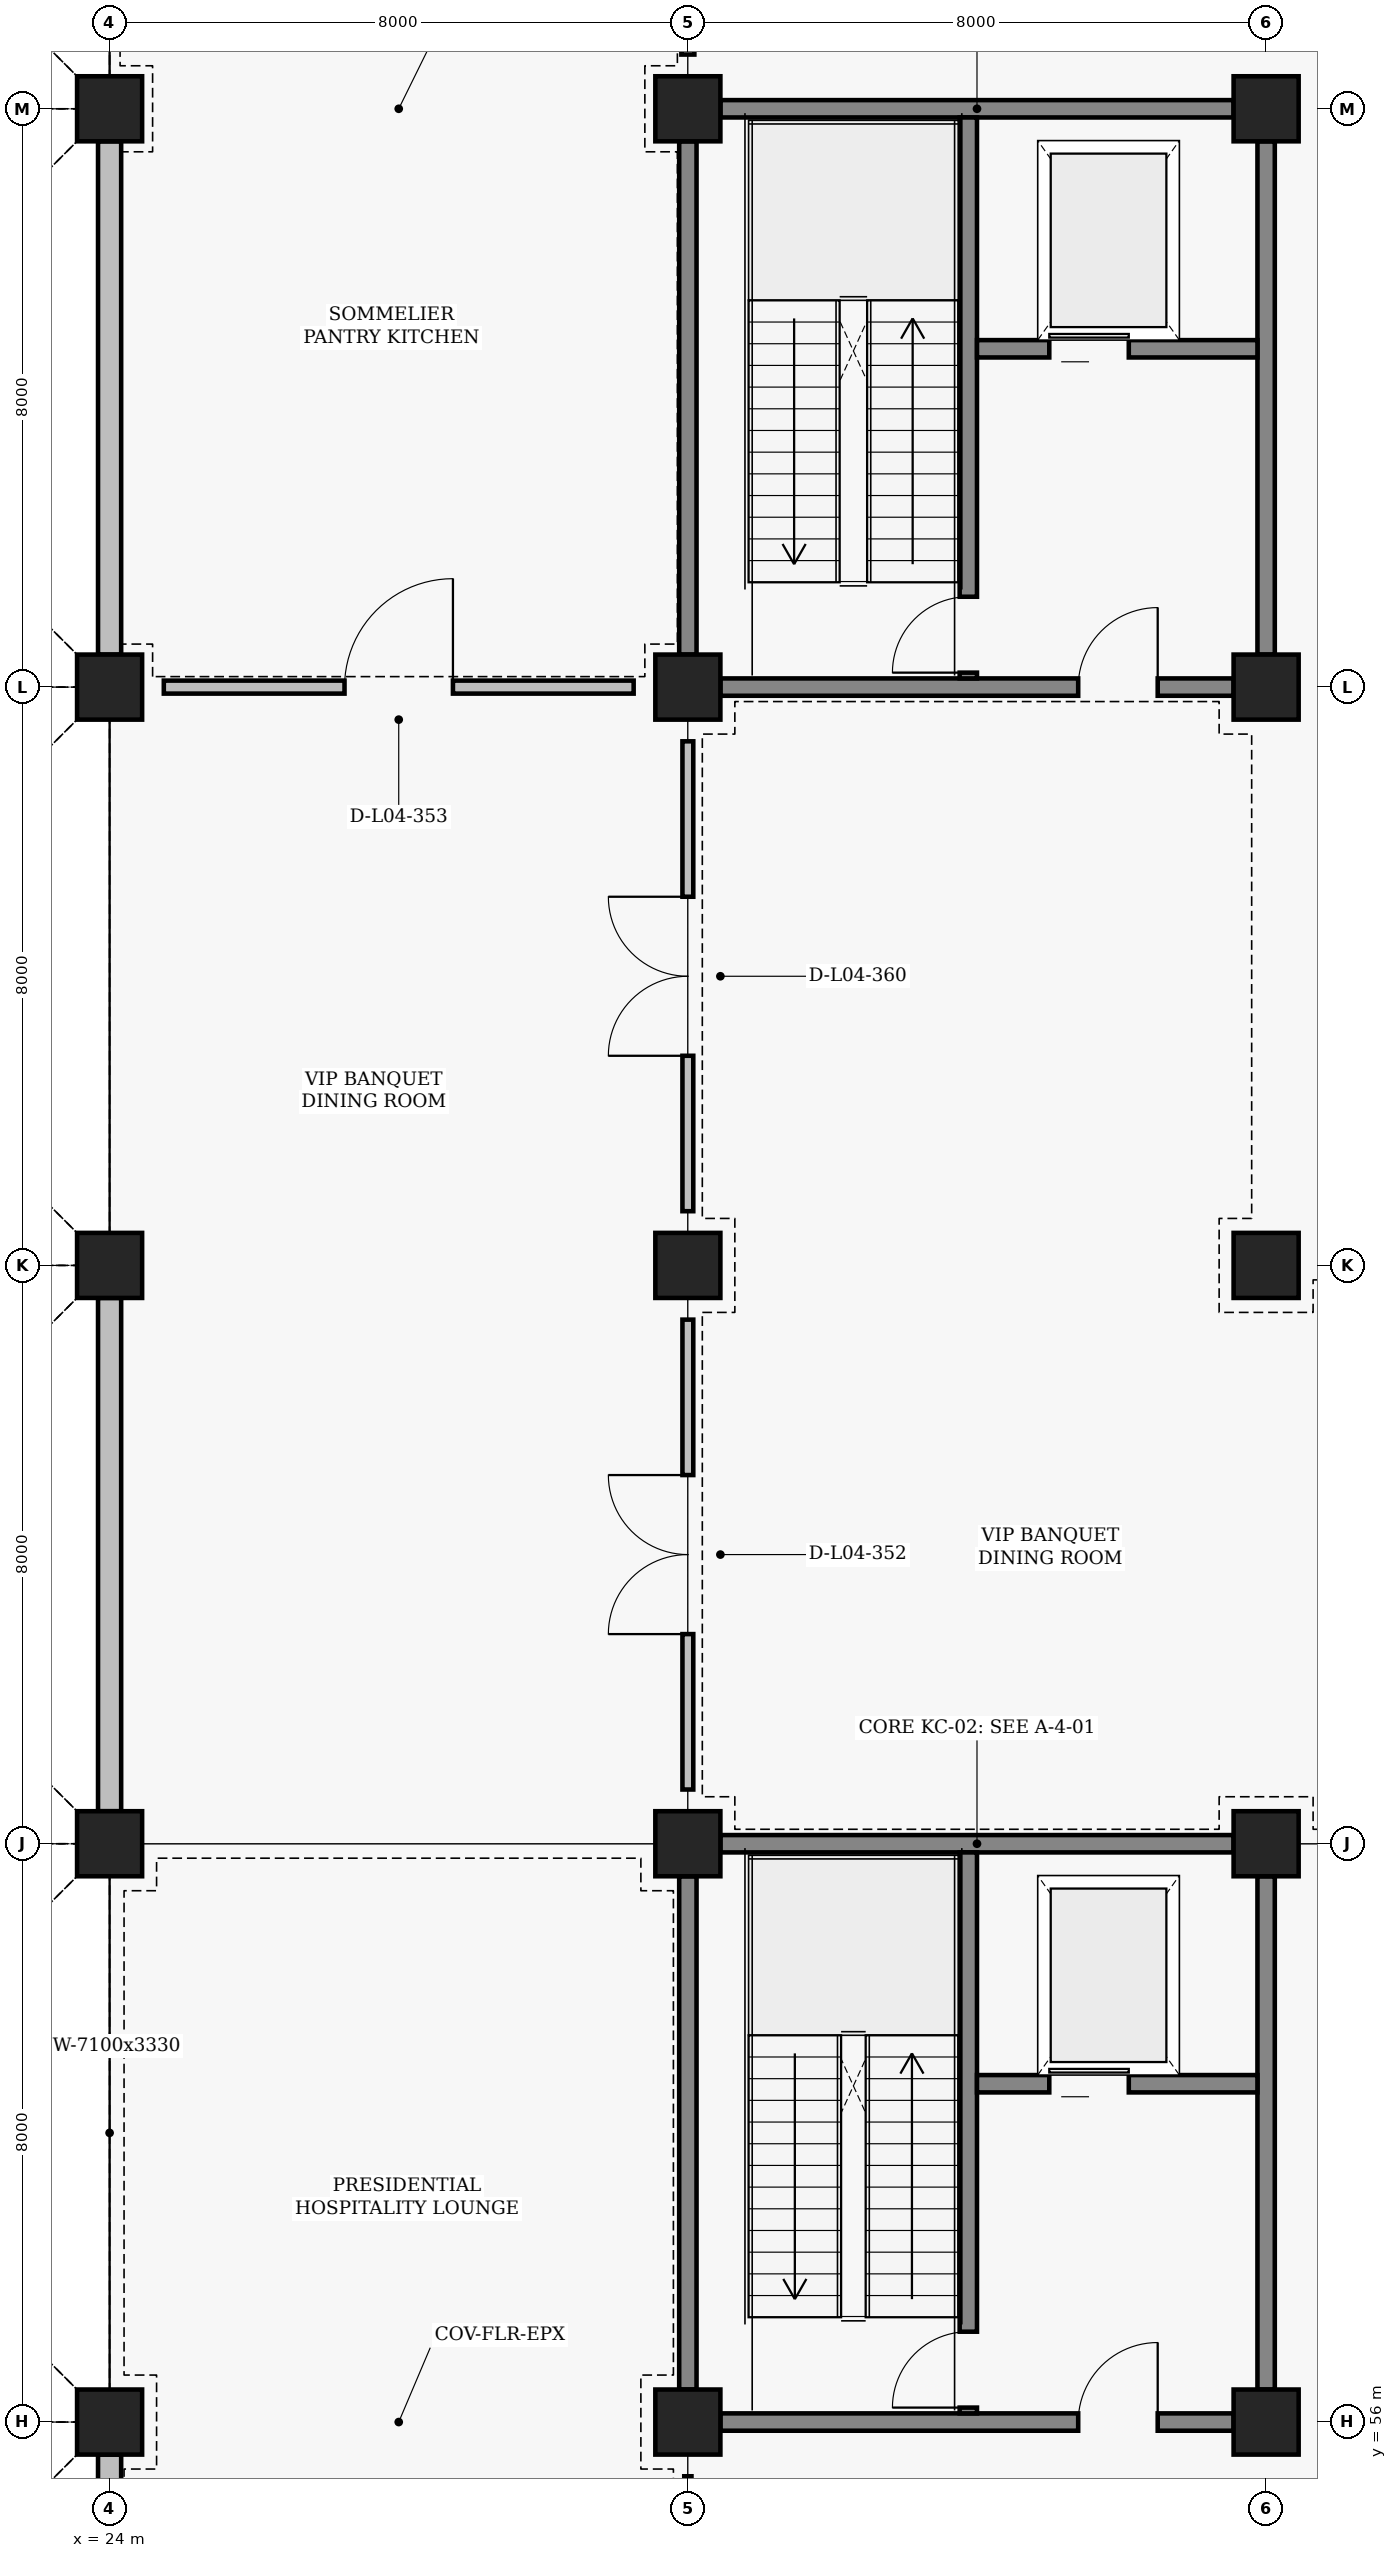
"""IFC4 building model, lengths in metres.
Left out: names, types, materials, properties, quantities, classifications, styles, units other than length and angle.
Written with IfcOpenShell. Run it as: python <this file> out.ifc"""

import sys

from ifc_helpers import new_model, si_unit, direction, frame, frame_2d, origin, origin_2d, place, context, subcontext, project, spatial, rectangle, extrude, element, fill, save


model = new_model("IFC4")
c1 = context("Model", 3, precision=1e-05, world=origin(), true_north=direction((0.0, 1.0)))
c2 = subcontext(c1, "Body", "Model", "MODEL_VIEW")
j1 = project(units=[si_unit("LENGTHUNIT", "METRE"), si_unit("PLANEANGLEUNIT", "RADIAN")], contexts=[c1])
p1 = place(None, origin())
s1 = spatial("IfcSite", under=j1, at=p1, CompositionType="ELEMENT")
p2 = place(p1, origin())
s2 = spatial("IfcBuilding", under=s1, at=p2, CompositionType="ELEMENT")
p3 = place(p2, frame((0.0, 0.0, 14.4)))
s3 = spatial("IfcBuildingStorey", under=s2, at=p3, CompositionType="ELEMENT", Elevation=14.4)
for number, where, z_axis, x_axis in (
    (1, (24.0, 56.0, 0.0), (0.0, 0.0, 1.0), (1.0, 0.0, 0.0)),
    (2, (24.0, 64.0, 0.0), (0.0, 0.0, 1.0), (1.0, 0.0, 0.0)),
    (3, (24.0, 72.0, 0.0), (0.0, 0.0, 1.0), (1.0, 0.0, 0.0)),
    (4, (24.0, 80.0, 0.0), (0.0, 0.0, 1.0), (1.0, 0.0, 0.0)),
    (5, (24.0, 88.0, 0.0), (0.0, 0.0, 1.0), (1.0, 0.0, 0.0)),
    (6, (32.0, 56.0, 0.0), (0.0, 0.0, 1.0), (1.0, 0.0, 0.0)),
    (7, (32.0, 64.0, 0.0), (0.0, 0.0, 1.0), (1.0, 0.0, 0.0)),
    (8, (32.0, 72.0, 0.0), (0.0, 0.0, 1.0), (1.0, 0.0, 0.0)),
    (9, (32.0, 80.0, 0.0), (0.0, 0.0, 1.0), (1.0, 0.0, 0.0)),
    (10, (32.0, 88.0, 0.0), (0.0, 0.0, 1.0), (1.0, 0.0, 0.0)),
    (11, (40.0, 56.0, 0.0), (0.0, 0.0, 1.0), (1.0, 0.0, 0.0)),
    (12, (40.0, 64.0, 0.0), (0.0, 0.0, 1.0), (1.0, 0.0, 0.0)),
    (13, (40.0, 72.0, 0.0), (0.0, 0.0, 1.0), (1.0, 0.0, 0.0)),
    (14, (40.0, 80.0, 0.0), (0.0, 0.0, 1.0), (1.0, 0.0, 0.0)),
    (15, (40.0, 88.0, 0.0), (0.0, 0.0, 1.0), (1.0, 0.0, 0.0)),
):
    element("IfcColumn", number, at=place(p3, frame(where, z_axis=z_axis, x_axis=x_axis)), inside=s3, PredefinedType="COLUMN", context=c2, shape_type="SweptSolid", body=[
        extrude(rectangle(XDim=0.9, YDim=0.9, at=origin_2d()), origin(), (0.0, 0.0, 1.0), 4.2),
    ])
for number, where, z_axis, x_axis in (
    (16, (24.0, 48.45, 0.0), (0.0, 0.0, 1.0), (0.0, 1.0, 0.0)),
    (17, (24.0, 64.45, 0.0), (0.0, 0.0, 1.0), (0.0, 1.0, 0.0)),
    (18, (24.0, 80.45, 0.0), (0.0, 0.0, 1.0), (0.0, 1.0, 0.0)),
):
    element("IfcWall", number, at=place(p3, frame(where, z_axis=z_axis, x_axis=x_axis)), inside=s3, PredefinedType="SOLIDWALL", context=c2, shape_type="SweptSolid", body=[
        extrude(rectangle(XDim=7.1, YDim=0.32, at=frame_2d((3.55, 0.0))), origin(), (0.0, 0.0, 1.0), 3.33),
    ])
p4 = place(p3, frame((32.45, 56.0, 0.0), z_axis=(0.0, 0.0, 1.0), x_axis=(1.0, 0.0, 0.0)))
e19 = element("IfcWall", 19, at=p4, inside=s3, PredefinedType="SHEAR", context=c2, shape_type="SweptSolid", body=[
    extrude(rectangle(XDim=7.1, YDim=0.24, at=frame_2d((3.55, 0.0))), origin(), (0.0, 0.0, 1.0), 3.33),
])
p5 = place(p4, frame((4.95, 0.0, 0.0)))
e20 = element("IfcOpeningElement", 20, at=p5, cuts=e19, PredefinedType="OPENING", context=c2, shape_type="SweptSolid", body=[
    extrude(rectangle(XDim=1.1, YDim=2.2, at=frame_2d((0.55, 1.1))), frame((0.0, 0.13, 0.0), z_axis=(0.0, -1.0, 0.0), x_axis=(1.0, 0.0, 0.0)), (0.0, 0.0, 1.0), 0.26),
])
for number, where, z_axis, x_axis in (
    (21, (32.45, 64.0, 0.0), (0.0, 0.0, 1.0), (1.0, 0.0, 0.0)),
    (22, (32.0, 56.45, 0.0), (0.0, 0.0, 1.0), (0.0, 1.0, 0.0)),
    (23, (40.0, 56.45, 0.0), (0.0, 0.0, 1.0), (0.0, 1.0, 0.0)),
):
    element("IfcWall", number, at=place(p3, frame(where, z_axis=z_axis, x_axis=x_axis)), inside=s3, PredefinedType="SHEAR", context=c2, shape_type="SweptSolid", body=[
        extrude(rectangle(XDim=7.1, YDim=0.24, at=frame_2d((3.55, 0.0))), origin(), (0.0, 0.0, 1.0), 3.33),
    ])
p6 = place(p3, frame((35.88, 56.12, 0.0), z_axis=(0.0, 0.0, 1.0), x_axis=(0.0, 1.0, 0.0)))
e24 = element("IfcWall", 24, at=p6, inside=s3, PredefinedType="SHEAR", context=c2, shape_type="SweptSolid", body=[
    extrude(rectangle(XDim=7.76, YDim=0.24, at=frame_2d((3.88, 0.0))), origin(), (0.0, 0.0, 1.0), 3.43),
])
p7 = place(p6, frame((0.08, 0.0, 0.0)))
e25 = element("IfcOpeningElement", 25, at=p7, cuts=e24, PredefinedType="OPENING", context=c2, shape_type="SweptSolid", body=[
    extrude(rectangle(XDim=1.05, YDim=2.15, at=frame_2d((0.525, 1.075))), frame((0.0, 0.13, 0.0), z_axis=(0.0, -1.0, 0.0), x_axis=(1.0, 0.0, 0.0)), (0.0, 0.0, 1.0), 0.26),
])
p8 = place(p3, frame((36.0, 60.68, 0.0), z_axis=(0.0, 0.0, 1.0), x_axis=(1.0, 0.0, 0.0)))
e26 = element("IfcWall", 26, at=p8, inside=s3, PredefinedType="SHEAR", context=c2, shape_type="SweptSolid", body=[
    extrude(rectangle(XDim=3.88, YDim=0.24, at=frame_2d((1.94, 0.0))), origin(), (0.0, 0.0, 1.0), 3.33),
])
p9 = place(p8, frame((1.0, 0.0, 0.0)))
e27 = element("IfcOpeningElement", 27, at=p9, cuts=e26, PredefinedType="OPENING", context=c2, shape_type="SweptSolid", body=[
    extrude(rectangle(XDim=1.1, YDim=2.15, at=frame_2d((0.55, 1.075))), frame((0.0, 0.13, 0.0), z_axis=(0.0, -1.0, 0.0), x_axis=(1.0, 0.0, 0.0)), (0.0, 0.0, 1.0), 0.26),
])
p10 = place(p3, frame((32.45, 80.0, 0.0), z_axis=(0.0, 0.0, 1.0), x_axis=(1.0, 0.0, 0.0)))
e28 = element("IfcWall", 28, at=p10, inside=s3, PredefinedType="SHEAR", context=c2, shape_type="SweptSolid", body=[
    extrude(rectangle(XDim=7.1, YDim=0.24, at=frame_2d((3.55, 0.0))), origin(), (0.0, 0.0, 1.0), 3.33),
])
p11 = place(p10, frame((4.95, 0.0, 0.0)))
e29 = element("IfcOpeningElement", 29, at=p11, cuts=e28, PredefinedType="OPENING", context=c2, shape_type="SweptSolid", body=[
    extrude(rectangle(XDim=1.1, YDim=2.2, at=frame_2d((0.55, 1.1))), frame((0.0, 0.13, 0.0), z_axis=(0.0, -1.0, 0.0), x_axis=(1.0, 0.0, 0.0)), (0.0, 0.0, 1.0), 0.26),
])
for number, where, z_axis, x_axis in (
    (30, (32.45, 88.0, 0.0), (0.0, 0.0, 1.0), (1.0, 0.0, 0.0)),
    (31, (32.0, 80.45, 0.0), (0.0, 0.0, 1.0), (0.0, 1.0, 0.0)),
    (32, (40.0, 80.45, 0.0), (0.0, 0.0, 1.0), (0.0, 1.0, 0.0)),
):
    element("IfcWall", number, at=place(p3, frame(where, z_axis=z_axis, x_axis=x_axis)), inside=s3, PredefinedType="SHEAR", context=c2, shape_type="SweptSolid", body=[
        extrude(rectangle(XDim=7.1, YDim=0.24, at=frame_2d((3.55, 0.0))), origin(), (0.0, 0.0, 1.0), 3.33),
    ])
p12 = place(p3, frame((35.88, 80.12, 0.0), z_axis=(0.0, 0.0, 1.0), x_axis=(0.0, 1.0, 0.0)))
e33 = element("IfcWall", 33, at=p12, inside=s3, PredefinedType="SHEAR", context=c2, shape_type="SweptSolid", body=[
    extrude(rectangle(XDim=7.76, YDim=0.24, at=frame_2d((3.88, 0.0))), origin(), (0.0, 0.0, 1.0), 3.43),
])
p13 = place(p12, frame((0.08, 0.0, 0.0)))
e34 = element("IfcOpeningElement", 34, at=p13, cuts=e33, PredefinedType="OPENING", context=c2, shape_type="SweptSolid", body=[
    extrude(rectangle(XDim=1.05, YDim=2.15, at=frame_2d((0.525, 1.075))), frame((0.0, 0.13, 0.0), z_axis=(0.0, -1.0, 0.0), x_axis=(1.0, 0.0, 0.0)), (0.0, 0.0, 1.0), 0.26),
])
p14 = place(p3, frame((36.0, 84.68, 0.0), z_axis=(0.0, 0.0, 1.0), x_axis=(1.0, 0.0, 0.0)))
e35 = element("IfcWall", 35, at=p14, inside=s3, PredefinedType="SHEAR", context=c2, shape_type="SweptSolid", body=[
    extrude(rectangle(XDim=3.88, YDim=0.24, at=frame_2d((1.94, 0.0))), origin(), (0.0, 0.0, 1.0), 3.33),
])
p15 = place(p14, frame((1.0, 0.0, 0.0)))
e36 = element("IfcOpeningElement", 36, at=p15, cuts=e35, PredefinedType="OPENING", context=c2, shape_type="SweptSolid", body=[
    extrude(rectangle(XDim=1.1, YDim=2.15, at=frame_2d((0.55, 1.075))), frame((0.0, 0.13, 0.0), z_axis=(0.0, -1.0, 0.0), x_axis=(1.0, 0.0, 0.0)), (0.0, 0.0, 1.0), 0.26),
])
p16 = place(p3, frame((32.0, 48.75, 0.0), z_axis=(0.0, 0.0, 1.0), x_axis=(0.0, 1.0, 0.0)))
e37 = element("IfcWall", 37, at=p16, inside=s3, PredefinedType="PARTITIONING", context=c2, shape_type="SweptSolid", body=[
    extrude(rectangle(XDim=6.5, YDim=0.1, at=frame_2d((3.25, 0.0))), origin(), (0.0, 0.0, 1.0), 3.33),
])
p17 = place(p16, frame((2.775, 0.0, 0.0)))
e38 = element("IfcOpeningElement", 38, at=p17, cuts=e37, PredefinedType="OPENING", context=c2, shape_type="SweptSolid", body=[
    extrude(rectangle(XDim=0.95, YDim=2.1, at=frame_2d((0.475, 1.05))), frame((0.0, 0.06, 0.0), z_axis=(0.0, -1.0, 0.0), x_axis=(1.0, 0.0, 0.0)), (0.0, 0.0, 1.0), 0.12),
])
p18 = place(p3, frame((32.0, 64.75, 0.0), z_axis=(0.0, 0.0, 1.0), x_axis=(0.0, 1.0, 0.0)))
e39 = element("IfcWall", 39, at=p18, inside=s3, PredefinedType="PARTITIONING", context=c2, shape_type="SweptSolid", body=[
    extrude(rectangle(XDim=6.5, YDim=0.15, at=frame_2d((3.25, 0.0))), origin(), (0.0, 0.0, 1.0), 3.33),
])
p19 = place(p18, frame((2.15, 0.0, 0.0)))
e40 = element("IfcOpeningElement", 40, at=p19, cuts=e39, PredefinedType="OPENING", context=c2, shape_type="SweptSolid", body=[
    extrude(rectangle(XDim=2.2, YDim=2.4, at=frame_2d((1.1, 1.2))), frame((0.0, 0.085, 0.0), z_axis=(0.0, -1.0, 0.0), x_axis=(1.0, 0.0, 0.0)), (0.0, 0.0, 1.0), 0.17),
])
p20 = place(p3, frame((24.75, 80.0, 0.0), z_axis=(0.0, 0.0, 1.0), x_axis=(1.0, 0.0, 0.0)))
e41 = element("IfcWall", 41, at=p20, inside=s3, PredefinedType="PARTITIONING", context=c2, shape_type="SweptSolid", body=[
    extrude(rectangle(XDim=6.5, YDim=0.18, at=frame_2d((3.25, 0.0))), origin(), (0.0, 0.0, 1.0), 3.43),
])
p21 = place(p20, frame((2.5, 0.0, 0.0)))
e42 = element("IfcOpeningElement", 42, at=p21, cuts=e41, PredefinedType="OPENING", context=c2, shape_type="SweptSolid", body=[
    extrude(rectangle(XDim=1.5, YDim=2.2, at=frame_2d((0.75, 1.1))), frame((0.0, 0.1, 0.0), z_axis=(0.0, -1.0, 0.0), x_axis=(1.0, 0.0, 0.0)), (0.0, 0.0, 1.0), 0.2),
])
p22 = place(p3, frame((32.0, 72.75, 0.0), z_axis=(0.0, 0.0, 1.0), x_axis=(0.0, 1.0, 0.0)))
e43 = element("IfcWall", 43, at=p22, inside=s3, PredefinedType="PARTITIONING", context=c2, shape_type="SweptSolid", body=[
    extrude(rectangle(XDim=6.5, YDim=0.15, at=frame_2d((3.25, 0.0))), origin(), (0.0, 0.0, 1.0), 3.33),
])
p23 = place(p22, frame((2.15, 0.0, 0.0)))
e44 = element("IfcOpeningElement", 44, at=p23, cuts=e43, PredefinedType="OPENING", context=c2, shape_type="SweptSolid", body=[
    extrude(rectangle(XDim=2.2, YDim=2.4, at=frame_2d((1.1, 1.2))), frame((0.0, 0.085, 0.0), z_axis=(0.0, -1.0, 0.0), x_axis=(1.0, 0.0, 0.0)), (0.0, 0.0, 1.0), 0.17),
])
p24 = place(p3, frame((32.0, 88.75, 0.0), z_axis=(0.0, 0.0, 1.0), x_axis=(0.0, 1.0, 0.0)))
e45 = element("IfcWall", 45, at=p24, inside=s3, PredefinedType="PARTITIONING", context=c2, shape_type="SweptSolid", body=[
    extrude(rectangle(XDim=6.5, YDim=0.18, at=frame_2d((3.25, 0.0))), origin(), (0.0, 0.0, 1.0), 3.33),
])
p25 = place(p24, frame((2.5, 0.0, 0.0)))
e46 = element("IfcOpeningElement", 46, at=p25, cuts=e45, PredefinedType="OPENING", context=c2, shape_type="SweptSolid", body=[
    extrude(rectangle(XDim=1.5, YDim=2.2, at=frame_2d((0.75, 1.1))), frame((0.0, 0.1, 0.0), z_axis=(0.0, -1.0, 0.0), x_axis=(1.0, 0.0, 0.0)), (0.0, 0.0, 1.0), 0.2),
])
p26 = place(p5, origin())
e47 = element("IfcDoor", 47, at=p26, inside=s3, OperationType="SINGLE_SWING_RIGHT", PredefinedType="DOOR", context=c2, shape_type="SweptSolid", body=[
    extrude(rectangle(XDim=1.1, YDim=2.2, at=frame_2d((0.55, 1.1))), frame((0.0, 0.025, 0.0), z_axis=(0.0, -1.0, 0.0), x_axis=(1.0, 0.0, 0.0)), (0.0, 0.0, 1.0), 0.05),
])
fill(e20, e47)
p27 = place(p7, origin())
e48 = element("IfcDoor", 48, at=p27, inside=s3, OperationType="SINGLE_SWING_LEFT", PredefinedType="DOOR", context=c2, shape_type="SweptSolid", body=[
    extrude(rectangle(XDim=1.05, YDim=2.15, at=frame_2d((0.525, 1.075))), frame((0.0, 0.025, 0.0), z_axis=(0.0, -1.0, 0.0), x_axis=(1.0, 0.0, 0.0)), (0.0, 0.0, 1.0), 0.05),
])
fill(e25, e48)
p28 = place(p9, origin())
e49 = element("IfcDoor", 49, at=p28, inside=s3, OperationType="SLIDING_TO_LEFT", PredefinedType="DOOR", context=c2, shape_type="SweptSolid", body=[
    extrude(rectangle(XDim=1.1, YDim=2.15, at=frame_2d((0.55, 1.075))), frame((0.0, 0.025, 0.0), z_axis=(0.0, -1.0, 0.0), x_axis=(1.0, 0.0, 0.0)), (0.0, 0.0, 1.0), 0.05),
])
fill(e27, e49)
p29 = place(p11, origin())
e50 = element("IfcDoor", 50, at=p29, inside=s3, OperationType="SINGLE_SWING_RIGHT", PredefinedType="DOOR", context=c2, shape_type="SweptSolid", body=[
    extrude(rectangle(XDim=1.1, YDim=2.2, at=frame_2d((0.55, 1.1))), frame((0.0, 0.025, 0.0), z_axis=(0.0, -1.0, 0.0), x_axis=(1.0, 0.0, 0.0)), (0.0, 0.0, 1.0), 0.05),
])
fill(e29, e50)
p30 = place(p13, origin())
e51 = element("IfcDoor", 51, at=p30, inside=s3, OperationType="SINGLE_SWING_LEFT", PredefinedType="DOOR", context=c2, shape_type="SweptSolid", body=[
    extrude(rectangle(XDim=1.05, YDim=2.15, at=frame_2d((0.525, 1.075))), frame((0.0, 0.025, 0.0), z_axis=(0.0, -1.0, 0.0), x_axis=(1.0, 0.0, 0.0)), (0.0, 0.0, 1.0), 0.05),
])
fill(e34, e51)
p31 = place(p15, origin())
e52 = element("IfcDoor", 52, at=p31, inside=s3, OperationType="SLIDING_TO_LEFT", PredefinedType="DOOR", context=c2, shape_type="SweptSolid", body=[
    extrude(rectangle(XDim=1.1, YDim=2.15, at=frame_2d((0.55, 1.075))), frame((0.0, 0.025, 0.0), z_axis=(0.0, -1.0, 0.0), x_axis=(1.0, 0.0, 0.0)), (0.0, 0.0, 1.0), 0.05),
])
fill(e36, e52)
p32 = place(p19, origin())
e53 = element("IfcDoor", 53, at=p32, inside=s3, OperationType="DOUBLE_SWING_LEFT", PredefinedType="DOOR", context=c2, shape_type="SweptSolid", body=[
    extrude(rectangle(XDim=2.2, YDim=2.4, at=frame_2d((1.1, 1.2))), frame((0.0, 0.025, 0.0), z_axis=(0.0, -1.0, 0.0), x_axis=(1.0, 0.0, 0.0)), (0.0, 0.0, 1.0), 0.05),
])
fill(e40, e53)
p33 = place(p21, origin())
e54 = element("IfcDoor", 54, at=p33, inside=s3, OperationType="SINGLE_SWING_RIGHT", PredefinedType="DOOR", context=c2, shape_type="SweptSolid", body=[
    extrude(rectangle(XDim=1.5, YDim=2.2, at=frame_2d((0.75, 1.1))), frame((0.0, 0.025, 0.0), z_axis=(0.0, -1.0, 0.0), x_axis=(1.0, 0.0, 0.0)), (0.0, 0.0, 1.0), 0.05),
])
fill(e42, e54)
p34 = place(p23, origin())
e55 = element("IfcDoor", 55, at=p34, inside=s3, OperationType="DOUBLE_SWING_LEFT", PredefinedType="DOOR", context=c2, shape_type="SweptSolid", body=[
    extrude(rectangle(XDim=2.2, YDim=2.4, at=frame_2d((1.1, 1.2))), frame((0.0, 0.025, 0.0), z_axis=(0.0, -1.0, 0.0), x_axis=(1.0, 0.0, 0.0)), (0.0, 0.0, 1.0), 0.05),
])
fill(e44, e55)
save(model, sys.argv[1])
